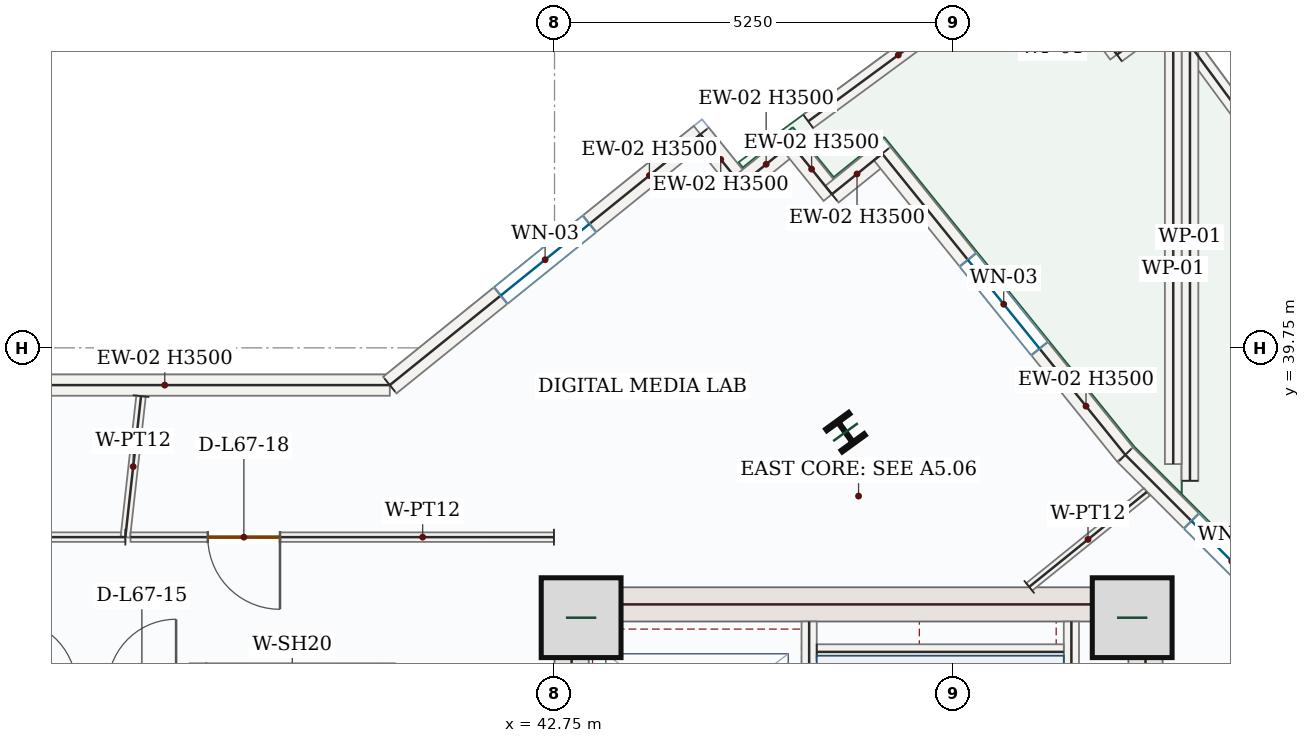
"""IFC4 building model, lengths in metres.
Left out: names, types, materials, properties, quantities, classifications, styles, units other than length and angle.
Written with IfcOpenShell. Run it as: python <this file> out.ifc"""

import sys

from ifc_helpers import new_model, si_unit, direction, frame, frame_2d, origin, origin_2d, place, context, subcontext, project, spatial, rectangle, i_section, extrude, source, transform, mapped, element, fill, save


model = new_model("IFC4")
c1 = context("Model", 3, precision=1e-05, world=origin(), true_north=direction((0.0, 1.0)))
c2 = subcontext(c1, "Body", "Model", "MODEL_VIEW")
j1 = project(units=[si_unit("LENGTHUNIT", "METRE"), si_unit("PLANEANGLEUNIT", "RADIAN")], contexts=[c1])
p1 = place(None, origin())
s1 = spatial("IfcSite", under=j1, at=p1, CompositionType="ELEMENT")
p2 = place(p1, origin())
s2 = spatial("IfcBuilding", under=s1, at=p2, CompositionType="ELEMENT")
p3 = place(p2, frame((0.0, 0.0, 280.35)))
s3 = spatial("IfcBuildingStorey", under=s2, at=p3, CompositionType="ELEMENT", Elevation=280.35)
p4 = place(p3, frame((42.975, 28.05, 0.0), z_axis=(0.0, 0.0, 1.0), x_axis=(0.0, 1.0, 0.0)))
e1 = element("IfcWall", 1, at=p4, inside=s3, PredefinedType="SHEAR", context=c2, shape_type="SweptSolid", body=[
    extrude(rectangle(XDim=8.55, YDim=0.45, at=frame_2d((4.275, 0.0))), origin(), (0.0, 0.0, 1.0), 3.5),
])
p5 = place(p4, frame((1.5, 0.0, 0.0)))
e2 = element("IfcOpeningElement", 2, at=p5, cuts=e1, PredefinedType="OPENING", context=c2, shape_type="SweptSolid", body=[
    extrude(rectangle(XDim=1.1, YDim=2.2, at=frame_2d((0.55, 1.1))), frame((0.0, 0.235, 0.0), z_axis=(0.0, -1.0, 0.0), x_axis=(1.0, 0.0, 0.0)), (0.0, 0.0, 1.0), 0.47),
])
m1 = source(origin(), c2, "Body", "SweptSolid", [
    extrude(rectangle(XDim=8.55, YDim=0.45, at=frame_2d((4.275, 0.0))), origin(), (0.0, 0.0, 1.0), 3.5),
])
p6 = place(p3, frame((50.525, 28.05, 0.0), z_axis=(0.0, 0.0, 1.0), x_axis=(0.0, 1.0, 0.0)))
e3 = element("IfcWall", 3, at=p6, inside=s3, PredefinedType="SHEAR", context=c2, shape_type="MappedRepresentation", body=[
    mapped(m1, transform((0.0, 0.0, 0.0), x_axis=(1.0, 0.0, 0.0), y_axis=(0.0, 1.0, 0.0), z_axis=(0.0, 0.0, 1.0), scale=1.0)),
])
m2 = source(origin(), c2, "Body", "SweptSolid", [
    extrude(rectangle(XDim=7.1, YDim=0.45, at=frame_2d((3.55, 0.0))), origin(), (0.0, 0.0, 1.0), 3.5),
])
p7 = place(p3, frame((43.2, 36.375, 0.0), z_axis=(0.0, 0.0, 1.0), x_axis=(1.0, 0.0, 0.0)))
e4 = element("IfcWall", 4, at=p7, inside=s3, PredefinedType="SHEAR", context=c2, shape_type="MappedRepresentation", body=[
    mapped(m2, transform((0.0, 0.0, 0.0), x_axis=(1.0, 0.0, 0.0), y_axis=(0.0, 1.0, 0.0), z_axis=(0.0, 0.0, 1.0), scale=1.0)),
])
m3 = source(origin(), c2, "Body", "SweptSolid", [
    extrude(rectangle(XDim=1.05, YDim=1.05, at=origin_2d()), origin(), (0.0, 0.0, 1.0), 3.75),
])
for number, where, z_axis, x_axis in (
    (5, (43.1, 36.2, 0.0), (0.0, 0.0, 1.0), (1.0, 0.0, 0.0)),
    (6, (50.35, 36.2, 0.0), (0.0, 0.0, 1.0), (1.0, 0.0, 0.0)),
):
    element("IfcColumn", number, at=place(p3, frame(where, z_axis=z_axis, x_axis=x_axis)), inside=s3, PredefinedType="COLUMN", context=c2, shape_type="MappedRepresentation", body=[
        mapped(m3, transform((0.0, 0.0, 0.0), x_axis=(1.0, 0.0, 0.0), y_axis=(0.0, 1.0, 0.0), z_axis=(0.0, 0.0, 1.0), scale=1.0)),
    ])
m4 = source(origin(), c2, "Body", "SweptSolid", [
    extrude(i_section(OverallWidth=0.374, OverallDepth=0.372, WebThickness=0.016, FlangeThickness=0.026, FilletRadius=0.018, at=origin_2d()), origin(), (0.0, 0.0, 1.0), 3.75),
])
p8 = place(p3, frame((46.578, 38.641, 0.0), z_axis=(0.0, 0.0, 1.0), x_axis=(0.809016994375, 0.587785252292, 0.0)))
e7 = element("IfcColumn", 7, at=p8, inside=s3, PredefinedType="COLUMN", context=c2, shape_type="MappedRepresentation", body=[
    mapped(m4, transform((0.0, 0.0, 0.0), x_axis=(1.0, 0.0, 0.0), y_axis=(0.0, 1.0, 0.0), z_axis=(0.0, 0.0, 1.0), scale=1.0)),
])
m5 = source(origin(), c2, "Body", "SweptSolid", [
    extrude(rectangle(XDim=9.514, YDim=0.22, at=frame_2d((4.757, 0.0))), origin(), (0.0, 0.0, 1.0), 1.2),
])
p9 = place(p3, frame((51.11, 43.737, 0.0), z_axis=(0.0, 0.0, 1.0), x_axis=(0.592724500616, -0.805405280818, 0.0)))
e8 = element("IfcWall", 8, at=p9, inside=s3, PredefinedType="PARAPET", context=c2, shape_type="MappedRepresentation", body=[
    mapped(m5, transform((0.0, 0.0, 0.0), x_axis=(1.0, 0.0, 0.0), y_axis=(0.0, 1.0, 0.0), z_axis=(0.0, 0.0, 1.0), scale=1.0)),
])
m6 = source(origin(), c2, "Body", "SweptSolid", [
    extrude(rectangle(XDim=5.736, YDim=0.22, at=frame_2d((2.868, 0.0))), origin(), (0.0, 0.0, 1.0), 1.2),
])
p10 = place(p3, frame((51.11, 38.001, 0.0), z_axis=(0.0, 0.0, 1.0), x_axis=(0.0, 1.0, 0.0)))
e9 = element("IfcWall", 9, at=p10, inside=s3, PredefinedType="PARAPET", context=c2, shape_type="MappedRepresentation", body=[
    mapped(m6, transform((0.0, 0.0, 0.0), x_axis=(1.0, 0.0, 0.0), y_axis=(0.0, 1.0, 0.0), z_axis=(0.0, 0.0, 1.0), scale=1.0)),
])
m7 = source(origin(), c2, "Body", "SweptSolid", [
    extrude(rectangle(XDim=2.942, YDim=0.22, at=frame_2d((1.471, 0.0))), origin(), (0.0, 0.0, 1.0), 1.2),
])
p11 = place(p3, frame((46.087, 42.73, 0.0), z_axis=(0.0, 0.0, 1.0), x_axis=(0.805443619549, 0.592672401692, 0.0)))
e10 = element("IfcWall", 10, at=p11, inside=s3, PredefinedType="PARAPET", context=c2, shape_type="MappedRepresentation", body=[
    mapped(m7, transform((0.0, 0.0, 0.0), x_axis=(1.0, 0.0, 0.0), y_axis=(0.0, 1.0, 0.0), z_axis=(0.0, 0.0, 1.0), scale=1.0)),
])
m8 = source(origin(), c2, "Body", "SweptSolid", [
    extrude(rectangle(XDim=0.85, YDim=0.22, at=frame_2d((0.425, 0.0))), origin(), (0.0, 0.0, 1.0), 1.2),
])
p12 = place(p3, frame((49.646, 44.293, 0.0), z_axis=(0.0, 0.0, 1.0), x_axis=(0.592807079659, -0.80534450163, 0.0)))
e11 = element("IfcWall", 11, at=p12, inside=s3, PredefinedType="PARAPET", context=c2, shape_type="MappedRepresentation", body=[
    mapped(m8, transform((0.0, 0.0, 0.0), x_axis=(1.0, 0.0, 0.0), y_axis=(0.0, 1.0, 0.0), z_axis=(0.0, 0.0, 1.0), scale=1.0)),
])
m9 = source(origin(), c2, "Body", "SweptSolid", [
    extrude(rectangle(XDim=0.85, YDim=0.22, at=frame_2d((0.425, 0.0))), origin(), (0.0, 0.0, 1.0), 1.2),
])
p13 = place(p3, frame((50.149, 43.608, 0.0), z_axis=(0.0, 0.0, 1.0), x_axis=(0.805481622783, 0.592620751712, 0.0)))
e12 = element("IfcWall", 12, at=p13, inside=s3, PredefinedType="PARAPET", context=c2, shape_type="MappedRepresentation", body=[
    mapped(m9, transform((0.0, 0.0, 0.0), x_axis=(1.0, 0.0, 0.0), y_axis=(0.0, 1.0, 0.0), z_axis=(0.0, 0.0, 1.0), scale=1.0)),
])
m10 = source(origin(), c2, "Body", "SweptSolid", [
    extrude(rectangle(XDim=5.815, YDim=0.22, at=frame_2d((2.907, 0.0))), origin(), (0.0, 0.0, 1.0), 1.2),
])
p14 = place(p3, frame((50.89, 44.036, 0.0), z_axis=(0.0, 0.0, 1.0), x_axis=(0.0, -1.0, 0.0)))
e13 = element("IfcWall", 13, at=p14, inside=s3, PredefinedType="PARAPET", context=c2, shape_type="MappedRepresentation", body=[
    mapped(m10, transform((0.0, 0.0, 0.0), x_axis=(1.0, 0.0, 0.0), y_axis=(0.0, 1.0, 0.0), z_axis=(0.0, 0.0, 1.0), scale=1.0)),
])
m11 = source(origin(), c2, "Body", "SweptSolid", [
    extrude(rectangle(XDim=5.922, YDim=0.28, at=frame_2d((2.961, 0.0))), origin(), (0.0, 0.0, 1.0), 3.5),
])
p15 = place(p3, frame((34.661, 39.26, 0.0), z_axis=(0.0, 0.0, 1.0), x_axis=(1.0, 0.0, 0.0)))
e14 = element("IfcWall", 14, at=p15, inside=s3, PredefinedType="SOLIDWALL", context=c2, shape_type="MappedRepresentation", body=[
    mapped(m11, transform((0.0, 0.0, 0.0), x_axis=(1.0, 0.0, 0.0), y_axis=(0.0, 1.0, 0.0), z_axis=(0.0, 0.0, 1.0), scale=1.0)),
])
p16 = place(p3, frame((40.583, 39.26, 0.0), z_axis=(0.0, 0.0, 1.0), x_axis=(0.778072238875, 0.628174809342, 0.0)))
e15 = element("IfcWall", 15, at=p16, inside=s3, PredefinedType="SOLIDWALL", context=c2, shape_type="SweptSolid", body=[
    extrude(rectangle(XDim=5.253, YDim=0.28, at=frame_2d((2.626, 0.0))), origin(), (0.0, 0.0, 1.0), 3.5),
])
p17 = place(p16, frame((1.876, 0.0, 0.85)))
e16 = element("IfcOpeningElement", 16, at=p17, cuts=e15, PredefinedType="OPENING", context=c2, shape_type="SweptSolid", body=[
    extrude(rectangle(XDim=1.5, YDim=1.5, at=frame_2d((0.75, 0.75))), frame((0.0, 0.15, 0.0), z_axis=(0.0, -1.0, 0.0), x_axis=(1.0, 0.0, 0.0)), (0.0, 0.0, 1.0), 0.3),
])
m12 = source(origin(), c2, "Body", "SweptSolid", [
    extrude(rectangle(XDim=0.85, YDim=0.28, at=frame_2d((0.425, 0.0))), origin(), (0.0, 0.0, 1.0), 3.5),
])
p18 = place(p3, frame((44.67, 42.56, 0.0), z_axis=(0.0, 0.0, 1.0), x_axis=(0.628156579423, -0.778086956405, 0.0)))
e17 = element("IfcWall", 17, at=p18, inside=s3, PredefinedType="SOLIDWALL", context=c2, shape_type="MappedRepresentation", body=[
    mapped(m12, transform((0.0, 0.0, 0.0), x_axis=(1.0, 0.0, 0.0), y_axis=(0.0, 1.0, 0.0), z_axis=(0.0, 0.0, 1.0), scale=1.0)),
])
m13 = source(origin(), c2, "Body", "SweptSolid", [
    extrude(rectangle(XDim=0.85, YDim=0.28, at=frame_2d((0.425, 0.0))), origin(), (0.0, 0.0, 1.0), 3.5),
])
p19 = place(p3, frame((45.204, 41.898, 0.0), z_axis=(0.0, 0.0, 1.0), x_axis=(0.777973585776, 0.628296983786, 0.0)))
e18 = element("IfcWall", 18, at=p19, inside=s3, PredefinedType="SOLIDWALL", context=c2, shape_type="MappedRepresentation", body=[
    mapped(m13, transform((0.0, 0.0, 0.0), x_axis=(1.0, 0.0, 0.0), y_axis=(0.0, 1.0, 0.0), z_axis=(0.0, 0.0, 1.0), scale=1.0)),
])
p20 = place(p3, frame((45.865, 42.432, 0.0), z_axis=(0.0, 0.0, 1.0), x_axis=(0.628330422687, -0.777946579095, 0.0)))
e19 = element("IfcWall", 19, at=p20, inside=s3, PredefinedType="SOLIDWALL", context=c2, shape_type="MappedRepresentation", body=[
    mapped(m12, transform((0.0, 0.0, 0.0), x_axis=(1.0, 0.0, 0.0), y_axis=(0.0, 1.0, 0.0), z_axis=(0.0, 0.0, 1.0), scale=1.0)),
])
p21 = place(p3, frame((46.399, 41.771, 0.0), z_axis=(0.0, 0.0, 1.0), x_axis=(0.777973585776, 0.628296983786, 0.0)))
e20 = element("IfcWall", 20, at=p21, inside=s3, PredefinedType="SOLIDWALL", context=c2, shape_type="MappedRepresentation", body=[
    mapped(m13, transform((0.0, 0.0, 0.0), x_axis=(1.0, 0.0, 0.0), y_axis=(0.0, 1.0, 0.0), z_axis=(0.0, 0.0, 1.0), scale=1.0)),
])
p22 = place(p3, frame((47.06, 42.305, 0.0), z_axis=(0.0, 0.0, 1.0), x_axis=(0.628225517447, -0.778031297075, 0.0)))
e21 = element("IfcWall", 21, at=p22, inside=s3, PredefinedType="SOLIDWALL", context=c2, shape_type="SweptSolid", body=[
    extrude(rectangle(XDim=5.093, YDim=0.28, at=frame_2d((2.546, 0.0))), origin(), (0.0, 0.0, 1.0), 3.5),
])
p23 = place(p22, frame((1.796, 0.0, 0.85)))
e22 = element("IfcOpeningElement", 22, at=p23, cuts=e21, PredefinedType="OPENING", context=c2, shape_type="SweptSolid", body=[
    extrude(rectangle(XDim=1.5, YDim=1.5, at=frame_2d((0.75, 0.75))), frame((0.0, 0.15, 0.0), z_axis=(0.0, -1.0, 0.0), x_axis=(1.0, 0.0, 0.0)), (0.0, 0.0, 1.0), 0.3),
])
p24 = place(p3, frame((50.26, 38.342, 0.0), z_axis=(0.0, 0.0, 1.0), x_axis=(0.707106781187, -0.707106781187, 0.0)))
e23 = element("IfcWall", 23, at=p24, inside=s3, PredefinedType="SOLIDWALL", context=c2, shape_type="SweptSolid", body=[
    extrude(rectangle(XDim=3.96, YDim=0.28, at=frame_2d((1.98, 0.0))), origin(), (0.0, 0.0, 1.0), 3.5),
])
p25 = place(p24, frame((1.23, 0.0, 0.85)))
e24 = element("IfcOpeningElement", 24, at=p25, cuts=e23, PredefinedType="OPENING", context=c2, shape_type="SweptSolid", body=[
    extrude(rectangle(XDim=1.5, YDim=1.5, at=frame_2d((0.75, 0.75))), frame((0.0, 0.15, 0.0), z_axis=(0.0, -1.0, 0.0), x_axis=(1.0, 0.0, 0.0)), (0.0, 0.0, 1.0), 0.3),
])
m14 = source(origin(), c2, "Body", "SweptSolid", [
    extrude(rectangle(XDim=7.87, YDim=0.2, at=frame_2d((3.935, 0.0))), origin(), (0.0, 0.0, 1.0), 3.5),
])
p26 = place(p3, frame((49.55, 28.28, 0.0), z_axis=(0.0, 0.0, 1.0), x_axis=(0.0, 1.0, 0.0)))
e25 = element("IfcWall", 25, at=p26, inside=s3, PredefinedType="SOLIDWALL", context=c2, shape_type="MappedRepresentation", body=[
    mapped(m14, transform((0.0, 0.0, 0.0), x_axis=(1.0, 0.0, 0.0), y_axis=(0.0, 1.0, 0.0), z_axis=(0.0, 0.0, 1.0), scale=1.0)),
])
p27 = place(p3, frame((46.1, 28.15, 0.0), z_axis=(0.0, 0.0, 1.0), x_axis=(0.0, 1.0, 0.0)))
e26 = element("IfcWall", 26, at=p27, inside=s3, PredefinedType="SOLIDWALL", context=c2, shape_type="SweptSolid", body=[
    extrude(rectangle(XDim=8.0, YDim=0.2, at=frame_2d((4.0, 0.0))), origin(), (0.0, 0.0, 1.0), 3.5),
])
p28 = place(p27, frame((0.4, 0.0, 0.0)))
e27 = element("IfcOpeningElement", 27, at=p28, cuts=e26, PredefinedType="OPENING", context=c2, shape_type="SweptSolid", body=[
    extrude(rectangle(XDim=1.05, YDim=2.15, at=frame_2d((0.525, 1.075))), frame((0.0, 0.11, 0.0), z_axis=(0.0, -1.0, 0.0), x_axis=(1.0, 0.0, 0.0)), (0.0, 0.0, 1.0), 0.22),
])
m15 = source(origin(), c2, "Body", "SweptSolid", [
    extrude(rectangle(XDim=3.25, YDim=0.2, at=frame_2d((1.625, 0.0))), origin(), (0.0, 0.0, 1.0), 3.5),
])
p29 = place(p3, frame((46.2, 35.75, 0.0), z_axis=(0.0, 0.0, 1.0), x_axis=(1.0, 0.0, 0.0)))
e28 = element("IfcWall", 28, at=p29, inside=s3, PredefinedType="SOLIDWALL", context=c2, shape_type="MappedRepresentation", body=[
    mapped(m15, transform((0.0, 0.0, 0.0), x_axis=(1.0, 0.0, 0.0), y_axis=(0.0, 1.0, 0.0), z_axis=(0.0, 0.0, 1.0), scale=1.0)),
])
m16 = source(origin(), c2, "Body", "SweptSolid", [
    extrude(rectangle(XDim=2.4, YDim=0.2, at=frame_2d((1.2, 0.0))), origin(), (0.0, 0.0, 1.0), 3.5),
])
p30 = place(p3, frame((38.05, 33.2, 0.0), z_axis=(0.0, 0.0, 1.0), x_axis=(0.0, 1.0, 0.0)))
e29 = element("IfcWall", 29, at=p30, inside=s3, PredefinedType="SOLIDWALL", context=c2, shape_type="MappedRepresentation", body=[
    mapped(m16, transform((0.0, 0.0, 0.0), x_axis=(1.0, 0.0, 0.0), y_axis=(0.0, 1.0, 0.0), z_axis=(0.0, 0.0, 1.0), scale=1.0)),
])
p31 = place(p3, frame((40.55, 33.2, 0.0), z_axis=(0.0, 0.0, 1.0), x_axis=(0.0, 1.0, 0.0)))
e30 = element("IfcWall", 30, at=p31, inside=s3, PredefinedType="SOLIDWALL", context=c2, shape_type="SweptSolid", body=[
    extrude(rectangle(XDim=2.4, YDim=0.2, at=frame_2d((1.2, 0.0))), origin(), (0.0, 0.0, 1.0), 3.5),
])
p32 = place(p31, frame((0.65, 0.0, 0.0)))
e31 = element("IfcOpeningElement", 31, at=p32, cuts=e30, PredefinedType="OPENING", context=c2, shape_type="SweptSolid", body=[
    extrude(rectangle(XDim=1.1, YDim=2.15, at=frame_2d((0.55, 1.075))), frame((0.0, 0.11, 0.0), z_axis=(0.0, -1.0, 0.0), x_axis=(1.0, 0.0, 0.0)), (0.0, 0.0, 1.0), 0.22),
])
m17 = source(origin(), c2, "Body", "SweptSolid", [
    extrude(rectangle(XDim=1.989, YDim=0.125, at=frame_2d((0.995, 0.0))), origin(), (0.0, 0.0, 1.0), 3.5),
])
p33 = place(p3, frame((48.995, 36.605, 0.0), z_axis=(0.0, 0.0, 1.0), x_axis=(0.778058853423, 0.628191388519, 0.0)))
e32 = element("IfcWall", 32, at=p33, inside=s3, PredefinedType="PARTITIONING", context=c2, shape_type="MappedRepresentation", body=[
    mapped(m17, transform((0.0, 0.0, 0.0), x_axis=(1.0, 0.0, 0.0), y_axis=(0.0, 1.0, 0.0), z_axis=(0.0, 0.0, 1.0), scale=1.0)),
])
p34 = place(p3, frame((37.104, 37.26, 0.0), z_axis=(0.0, 0.0, 1.0), x_axis=(-1.0, 0.0, 0.0)))
e33 = element("IfcWall", 33, at=p34, inside=s3, PredefinedType="PARTITIONING", context=c2, shape_type="SweptSolid", body=[
    extrude(rectangle(XDim=6.727, YDim=0.125, at=frame_2d((3.364, 0.0))), origin(), (0.0, 0.0, 1.0), 3.5),
])
p35 = place(p34, frame((1.271, 0.0, 0.0)))
e34 = element("IfcOpeningElement", 34, at=p35, cuts=e33, PredefinedType="OPENING", context=c2, shape_type="SweptSolid", body=[
    extrude(rectangle(XDim=0.95, YDim=2.15, at=frame_2d((0.475, 1.075))), frame((0.0, 0.073, 0.0), z_axis=(0.0, -1.0, 0.0), x_axis=(1.0, 0.0, 0.0)), (0.0, 0.0, 1.0), 0.145),
])
m18 = source(origin(), c2, "Body", "SweptSolid", [
    extrude(rectangle(XDim=1.866, YDim=0.125, at=frame_2d((0.933, 0.0))), origin(), (0.0, 0.0, 1.0), 3.5),
])
p36 = place(p3, frame((37.31, 39.115, 0.0), z_axis=(0.0, 0.0, 1.0), x_axis=(-0.110661229882, -0.993858185156, 0.0)))
e35 = element("IfcWall", 35, at=p36, inside=s3, PredefinedType="PARTITIONING", context=c2, shape_type="MappedRepresentation", body=[
    mapped(m18, transform((0.0, 0.0, 0.0), x_axis=(1.0, 0.0, 0.0), y_axis=(0.0, 1.0, 0.0), z_axis=(0.0, 0.0, 1.0), scale=1.0)),
])
p37 = place(p3, frame((42.742, 37.26, 0.0), z_axis=(0.0, 0.0, 1.0), x_axis=(-0.99999999904, 4.382505e-05, 0.0)))
e36 = element("IfcWall", 36, at=p37, inside=s3, PredefinedType="PARTITIONING", context=c2, shape_type="SweptSolid", body=[
    extrude(rectangle(XDim=5.571, YDim=0.125, at=frame_2d((2.785, 0.0))), origin(), (0.0, 0.0, 1.0), 3.5),
])
p38 = place(p37, frame((3.604, 0.0, 0.0)))
e37 = element("IfcOpeningElement", 37, at=p38, cuts=e36, PredefinedType="OPENING", context=c2, shape_type="SweptSolid", body=[
    extrude(rectangle(XDim=0.95, YDim=2.15, at=frame_2d((0.475, 1.075))), frame((0.0, 0.073, 0.0), z_axis=(0.0, -1.0, 0.0), x_axis=(1.0, 0.0, 0.0)), (0.0, 0.0, 1.0), 0.145),
])
m19 = source(origin(), c2, "Body", "SweptSolid", [
    extrude(rectangle(XDim=1.5, YDim=1.5, at=frame_2d((0.75, 0.75))), frame((0.0, 0.03, 0.0), z_axis=(0.0, -1.0, 0.0), x_axis=(1.0, 0.0, 0.0)), (0.0, 0.0, 1.0), 0.06),
])
p39 = place(p17, origin())
e38 = element("IfcWindow", 38, at=p39, inside=s3, PartitioningType="SINGLE_PANEL", PredefinedType="WINDOW", context=c2, shape_type="MappedRepresentation", body=[
    mapped(m19, transform((0.0, 0.0, 0.0), x_axis=(1.0, 0.0, 0.0), y_axis=(0.0, 1.0, 0.0), z_axis=(0.0, 0.0, 1.0), scale=1.0)),
])
fill(e16, e38)
p40 = place(p23, origin())
e39 = element("IfcWindow", 39, at=p40, inside=s3, PartitioningType="SINGLE_PANEL", PredefinedType="WINDOW", context=c2, shape_type="MappedRepresentation", body=[
    mapped(m19, transform((0.0, 0.0, 0.0), x_axis=(1.0, 0.0, 0.0), y_axis=(0.0, 1.0, 0.0), z_axis=(0.0, 0.0, 1.0), scale=1.0)),
])
fill(e22, e39)
p41 = place(p25, origin())
e40 = element("IfcWindow", 40, at=p41, inside=s3, PartitioningType="SINGLE_PANEL", PredefinedType="WINDOW", context=c2, shape_type="MappedRepresentation", body=[
    mapped(m19, transform((0.0, 0.0, 0.0), x_axis=(1.0, 0.0, 0.0), y_axis=(0.0, 1.0, 0.0), z_axis=(0.0, 0.0, 1.0), scale=1.0)),
])
fill(e24, e40)
m20 = source(origin(), c2, "Body", "SweptSolid", [
    extrude(rectangle(XDim=0.95, YDim=2.15, at=frame_2d((0.475, 1.075))), frame((0.0, 0.025, 0.0), z_axis=(0.0, -1.0, 0.0), x_axis=(1.0, 0.0, 0.0)), (0.0, 0.0, 1.0), 0.05),
])
p42 = place(p38, origin())
e41 = element("IfcDoor", 41, at=p42, inside=s3, OperationType="SINGLE_SWING_LEFT", PredefinedType="DOOR", context=c2, shape_type="MappedRepresentation", body=[
    mapped(m20, transform((0.0, 0.0, 0.0), x_axis=(1.0, 0.0, 0.0), y_axis=(0.0, 1.0, 0.0), z_axis=(0.0, 0.0, 1.0), scale=1.0)),
])
fill(e37, e41)
save(model, sys.argv[1])
